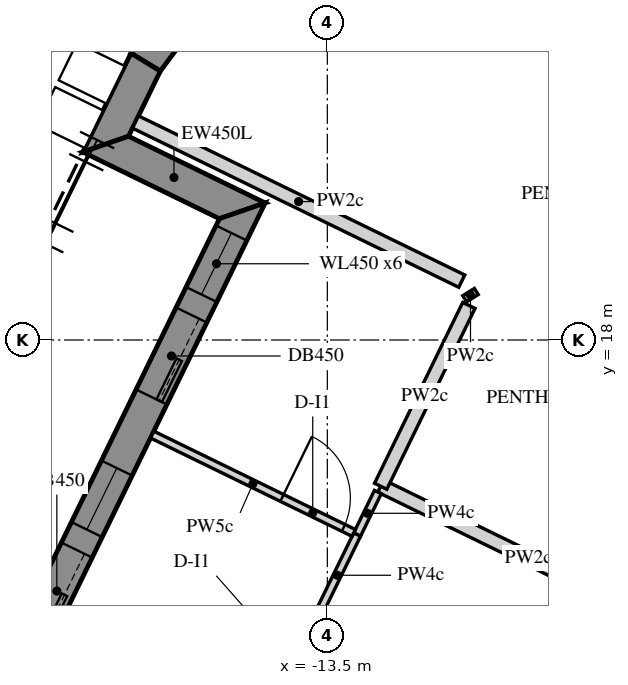
"""IFC4 building model, lengths in metres.
Left out: names, types, materials, properties, quantities, classifications, styles, units other than length and angle.
Written with IfcOpenShell. Run it as: python <this file> out.ifc"""

import sys

from ifc_helpers import new_model, si_unit, direction, frame, frame_2d, origin, place, context, subcontext, project, spatial, polyline, rectangle, outline, extrude, element, fill, save


model = new_model("IFC4")
c1 = context("Model", 3, precision=1e-05, world=origin(), true_north=direction((0.0, 1.0)))
c2 = subcontext(c1, "Body", "Model", "MODEL_VIEW")
j1 = project(units=[si_unit("LENGTHUNIT", "METRE"), si_unit("PLANEANGLEUNIT", "RADIAN")], contexts=[c1])
p1 = place(None, origin())
s1 = spatial("IfcSite", under=j1, at=p1, CompositionType="ELEMENT")
p2 = place(p1, origin())
s2 = spatial("IfcBuilding", under=s1, at=p2, CompositionType="ELEMENT")
p3 = place(p2, frame((0.0, 0.0, 361.2)))
s3 = spatial("IfcBuildingStorey", under=s2, at=p3, CompositionType="ELEMENT", Elevation=361.2)
p4 = place(p3, frame((-15.056, 22.776, -0.15), z_axis=(0.0, 0.0, 1.0), x_axis=(-0.597089203515, -0.802174845682, 0.0)))
e1 = element("IfcWall", 1, at=p4, inside=s3, PredefinedType="SOLIDWALL", context=c2, shape_type="SweptSolid", body=[
    extrude(outline(polyline([(-0.042, -0.225), (1.418, -0.225), (1.376, 0.225), (0.042, 0.225), (-0.042, -0.225)])), origin(), (0.0, 0.0, 1.0), 3.9),
])
p5 = place(p3, frame((-15.89, 21.655, -0.15), z_axis=(0.0, 0.0, 1.0), x_axis=(-0.438319390103, -0.898819287877, 0.0)))
e2 = element("IfcWall", 2, at=p5, inside=s3, PredefinedType="SOLIDWALL", context=c2, shape_type="SweptSolid", body=[
    extrude(outline(polyline([(-0.021, -0.225), (1.425, -0.225), (0.975, 0.225), (0.021, 0.225), (-0.021, -0.225)])), origin(), (0.0, 0.0, 1.0), 3.9),
])
p6 = place(p3, frame((-16.416, 20.576, -0.15), z_axis=(0.0, 0.0, 1.0), x_axis=(0.898730898244, -0.438500595829, 0.0)))
e3 = element("IfcWall", 3, at=p6, inside=s3, PredefinedType="SOLIDWALL", context=c2, shape_type="SweptSolid", body=[
    extrude(outline(polyline([(-0.225, -0.225), (1.775, -0.225), (2.225, 0.225), (0.225, 0.225), (-0.225, -0.225)])), origin(), (0.0, 0.0, 1.0), 3.9),
])
p7 = place(p3, frame((-14.619, 19.699, -0.15), z_axis=(0.0, 0.0, 1.0), x_axis=(-0.438373747484, -0.898792777851, 0.0)))
e4 = element("IfcWall", 4, at=p7, inside=s3, PredefinedType="SOLIDWALL", context=c2, shape_type="SweptSolid", body=[
    extrude(outline(polyline([(0.225, -0.225), (20.506, -0.225), (20.957, 0.225), (-0.225, 0.225), (0.225, -0.225)])), origin(), (0.0, 0.0, 1.0), 3.9),
])
p8 = place(p7, frame((0.325, 0.0, 1.05)))
e5 = element("IfcOpeningElement", 5, at=p8, cuts=e4, PredefinedType="OPENING", context=c2, shape_type="SweptSolid", body=[
    extrude(rectangle(XDim=0.9, YDim=1.5, at=frame_2d((0.45, 0.75))), frame((0.0, 0.235, 0.0), z_axis=(0.0, -1.0, 0.0), x_axis=(1.0, 0.0, 0.0)), (0.0, 0.0, 1.0), 0.47),
])
p9 = place(p7, frame((1.525, 0.0, 0.15)))
e6 = element("IfcOpeningElement", 6, at=p9, cuts=e4, PredefinedType="OPENING", context=c2, shape_type="SweptSolid", body=[
    extrude(rectangle(XDim=1.2, YDim=2.4, at=frame_2d((0.6, 1.2))), frame((0.0, 0.235, 0.0), z_axis=(0.0, -1.0, 0.0), x_axis=(1.0, 0.0, 0.0)), (0.0, 0.0, 1.0), 0.47),
])
p10 = place(p7, frame((3.766, 0.0, 1.05)))
e7 = element("IfcOpeningElement", 7, at=p10, cuts=e4, PredefinedType="OPENING", context=c2, shape_type="SweptSolid", body=[
    extrude(rectangle(XDim=0.9, YDim=1.5, at=frame_2d((0.45, 0.75))), frame((0.0, 0.235, 0.0), z_axis=(0.0, -1.0, 0.0), x_axis=(1.0, 0.0, 0.0)), (0.0, 0.0, 1.0), 0.47),
])
p11 = place(p7, frame((4.966, 0.0, 0.15)))
e8 = element("IfcOpeningElement", 8, at=p11, cuts=e4, PredefinedType="OPENING", context=c2, shape_type="SweptSolid", body=[
    extrude(rectangle(XDim=1.2, YDim=2.4, at=frame_2d((0.6, 1.2))), frame((0.0, 0.235, 0.0), z_axis=(0.0, -1.0, 0.0), x_axis=(1.0, 0.0, 0.0)), (0.0, 0.0, 1.0), 0.47),
])
p12 = place(p7, frame((7.366, 0.0, 1.05)))
e9 = element("IfcOpeningElement", 9, at=p12, cuts=e4, PredefinedType="OPENING", context=c2, shape_type="SweptSolid", body=[
    extrude(rectangle(XDim=0.9, YDim=1.5, at=frame_2d((0.45, 0.75))), frame((0.0, 0.235, 0.0), z_axis=(0.0, -1.0, 0.0), x_axis=(1.0, 0.0, 0.0)), (0.0, 0.0, 1.0), 0.47),
])
p13 = place(p7, frame((8.566, 0.0, 0.15)))
e10 = element("IfcOpeningElement", 10, at=p13, cuts=e4, PredefinedType="OPENING", context=c2, shape_type="SweptSolid", body=[
    extrude(rectangle(XDim=1.2, YDim=2.4, at=frame_2d((0.6, 1.2))), frame((0.0, 0.235, 0.0), z_axis=(0.0, -1.0, 0.0), x_axis=(1.0, 0.0, 0.0)), (0.0, 0.0, 1.0), 0.47),
])
p14 = place(p7, frame((10.966, 0.0, 1.05)))
e11 = element("IfcOpeningElement", 11, at=p14, cuts=e4, PredefinedType="OPENING", context=c2, shape_type="SweptSolid", body=[
    extrude(rectangle(XDim=0.9, YDim=1.5, at=frame_2d((0.45, 0.75))), frame((0.0, 0.235, 0.0), z_axis=(0.0, -1.0, 0.0), x_axis=(1.0, 0.0, 0.0)), (0.0, 0.0, 1.0), 0.47),
])
p15 = place(p7, frame((12.166, 0.0, 0.15)))
e12 = element("IfcOpeningElement", 12, at=p15, cuts=e4, PredefinedType="OPENING", context=c2, shape_type="SweptSolid", body=[
    extrude(rectangle(XDim=1.2, YDim=2.4, at=frame_2d((0.6, 1.2))), frame((0.0, 0.235, 0.0), z_axis=(0.0, -1.0, 0.0), x_axis=(1.0, 0.0, 0.0)), (0.0, 0.0, 1.0), 0.47),
])
p16 = place(p7, frame((14.566, 0.0, 1.05)))
e13 = element("IfcOpeningElement", 13, at=p16, cuts=e4, PredefinedType="OPENING", context=c2, shape_type="SweptSolid", body=[
    extrude(rectangle(XDim=0.9, YDim=1.5, at=frame_2d((0.45, 0.75))), frame((0.0, 0.235, 0.0), z_axis=(0.0, -1.0, 0.0), x_axis=(1.0, 0.0, 0.0)), (0.0, 0.0, 1.0), 0.47),
])
p17 = place(p7, frame((15.766, 0.0, 0.15)))
e14 = element("IfcOpeningElement", 14, at=p17, cuts=e4, PredefinedType="OPENING", context=c2, shape_type="SweptSolid", body=[
    extrude(rectangle(XDim=1.2, YDim=2.4, at=frame_2d((0.6, 1.2))), frame((0.0, 0.235, 0.0), z_axis=(0.0, -1.0, 0.0), x_axis=(1.0, 0.0, 0.0)), (0.0, 0.0, 1.0), 0.47),
])
p18 = place(p7, frame((18.007, 0.0, 1.05)))
e15 = element("IfcOpeningElement", 15, at=p18, cuts=e4, PredefinedType="OPENING", context=c2, shape_type="SweptSolid", body=[
    extrude(rectangle(XDim=0.9, YDim=1.5, at=frame_2d((0.45, 0.75))), frame((0.0, 0.235, 0.0), z_axis=(0.0, -1.0, 0.0), x_axis=(1.0, 0.0, 0.0)), (0.0, 0.0, 1.0), 0.47),
])
p19 = place(p7, frame((19.207, 0.0, 0.15)))
e16 = element("IfcOpeningElement", 16, at=p19, cuts=e4, PredefinedType="OPENING", context=c2, shape_type="SweptSolid", body=[
    extrude(rectangle(XDim=1.2, YDim=2.4, at=frame_2d((0.6, 1.2))), frame((0.0, 0.235, 0.0), z_axis=(0.0, -1.0, 0.0), x_axis=(1.0, 0.0, 0.0)), (0.0, 0.0, 1.0), 0.47),
])
p20 = place(p3, frame((-7.903, 16.075, 0.0), z_axis=(0.0, 0.0, 1.0), x_axis=(-0.438364761272, -0.898797160696, 0.0)))
e17 = element("IfcWall", 17, at=p20, inside=s3, PredefinedType="PARTITIONING", context=c2, shape_type="SweptSolid", body=[
    extrude(rectangle(XDim=15.688, YDim=0.15, at=frame_2d((7.844, 0.0))), origin(), (0.0, 0.0, 1.0), 2.82),
])
p21 = place(p20, frame((5.042, 0.0, 0.0)))
e18 = element("IfcOpeningElement", 18, at=p21, cuts=e17, PredefinedType="OPENING", context=c2, shape_type="SweptSolid", body=[
    extrude(rectangle(XDim=1.0, YDim=2.1, at=frame_2d((0.5, 1.05))), frame((0.0, 0.085, 0.0), z_axis=(0.0, -1.0, 0.0), x_axis=(1.0, 0.0, 0.0)), (0.0, 0.0, 1.0), 0.17),
])
p22 = place(p3, frame((-12.797, 16.079, 0.0), z_axis=(0.0, 0.0, 1.0), x_axis=(0.898786890582, -0.438385817879, 0.0)))
e19 = element("IfcWall", 19, at=p22, inside=s3, PredefinedType="PARTITIONING", context=c2, shape_type="SweptSolid", body=[
    extrude(rectangle(XDim=4.325, YDim=0.18, at=frame_2d((2.163, 0.0))), origin(), (0.0, 0.0, 1.0), 2.82),
])
p23 = place(p3, frame((-16.024, 20.868, 0.0), z_axis=(0.0, 0.0, 1.0), x_axis=(0.898790554329, -0.438378306317, 0.0)))
e20 = element("IfcWall", 20, at=p23, inside=s3, PredefinedType="PARTITIONING", context=c2, shape_type="SweptSolid", body=[
    extrude(rectangle(XDim=4.776, YDim=0.18, at=frame_2d((2.388, 0.0))), origin(), (0.0, 0.0, 1.0), 2.82),
])
p24 = place(p3, frame((-11.642, 18.63, 0.0), z_axis=(0.0, 0.0, 1.0), x_axis=(0.53069346288, -0.847563831494, 0.0)))
e21 = element("IfcWall", 21, at=p24, inside=s3, PredefinedType="PARTITIONING", context=c2, shape_type="SweptSolid", body=[
    extrude(rectangle(XDim=0.095, YDim=0.18, at=frame_2d((0.047, 0.0))), origin(), (0.0, 0.0, 1.0), 2.82),
])
p25 = place(p3, frame((-11.638, 18.455, 0.0), z_axis=(0.0, 0.0, 1.0), x_axis=(-0.438336396292, -0.898810994417, 0.0)))
e22 = element("IfcWall", 22, at=p25, inside=s3, PredefinedType="PARTITIONING", context=c2, shape_type="SweptSolid", body=[
    extrude(rectangle(XDim=2.647, YDim=0.18, at=frame_2d((1.323, 0.0))), origin(), (0.0, 0.0, 1.0), 2.82),
])
p26 = place(p3, frame((-12.835, 16.0, 0.0), z_axis=(0.0, 0.0, 1.0), x_axis=(-0.43824583471, -0.898855154271, 0.0)))
e23 = element("IfcWall", 23, at=p26, inside=s3, PredefinedType="PARTITIONING", context=c2, shape_type="SweptSolid", body=[
    extrude(rectangle(XDim=0.622, YDim=0.1, at=frame_2d((0.311, 0.0))), origin(), (0.0, 0.0, 1.0), 2.82),
])
p27 = place(p3, frame((-13.108, 15.44, 0.0), z_axis=(0.0, 0.0, 1.0), x_axis=(-0.438423632021, -0.898768445644, 0.0)))
e24 = element("IfcWall", 24, at=p27, inside=s3, PredefinedType="PARTITIONING", context=c2, shape_type="SweptSolid", body=[
    extrude(rectangle(XDim=1.192, YDim=0.1, at=frame_2d((0.596, 0.0))), origin(), (0.0, 0.0, 1.0), 2.82),
])
p28 = place(p3, frame((-15.804, 16.756, 0.0), z_axis=(0.0, 0.0, 1.0), x_axis=(0.898802642499, -0.438353521528, 0.0)))
e25 = element("IfcWall", 25, at=p28, inside=s3, PredefinedType="PARTITIONING", context=c2, shape_type="SweptSolid", body=[
    extrude(rectangle(XDim=2.95, YDim=0.1, at=frame_2d((1.475, 0.0))), origin(), (0.0, 0.0, 1.0), 2.82),
])
p29 = place(p28, frame((1.9, 0.0, 0.0)))
e26 = element("IfcOpeningElement", 26, at=p29, cuts=e25, PredefinedType="OPENING", context=c2, shape_type="SweptSolid", body=[
    extrude(rectangle(XDim=0.9, YDim=2.1, at=frame_2d((0.45, 1.05))), frame((0.0, 0.06, 0.0), z_axis=(0.0, -1.0, 0.0), x_axis=(1.0, 0.0, 0.0)), (0.0, 0.0, 1.0), 0.12),
])
p30 = place(p8, frame((0.0, 0.155, 0.0)))
e27 = element("IfcWindow", 27, at=p30, inside=s3, PartitioningType="SINGLE_PANEL", PredefinedType="WINDOW", context=c2, shape_type="SweptSolid", body=[
    extrude(rectangle(XDim=0.9, YDim=1.5, at=frame_2d((0.45, 0.75))), frame((0.0, 0.03, 0.0), z_axis=(0.0, -1.0, 0.0), x_axis=(1.0, 0.0, 0.0)), (0.0, 0.0, 1.0), 0.06),
])
fill(e5, e27)
p31 = place(p9, frame((0.0, 0.15, 0.0)))
e28 = element("IfcDoor", 28, at=p31, inside=s3, OperationType="SLIDING_TO_LEFT", PredefinedType="DOOR", context=c2, shape_type="SweptSolid", body=[
    extrude(rectangle(XDim=1.2, YDim=2.4, at=frame_2d((0.6, 1.2))), frame((0.0, 0.025, 0.0), z_axis=(0.0, -1.0, 0.0), x_axis=(1.0, 0.0, 0.0)), (0.0, 0.0, 1.0), 0.05),
])
fill(e6, e28)
p32 = place(p10, frame((0.0, 0.155, 0.0)))
e29 = element("IfcWindow", 29, at=p32, inside=s3, PartitioningType="SINGLE_PANEL", PredefinedType="WINDOW", context=c2, shape_type="SweptSolid", body=[
    extrude(rectangle(XDim=0.9, YDim=1.5, at=frame_2d((0.45, 0.75))), frame((0.0, 0.03, 0.0), z_axis=(0.0, -1.0, 0.0), x_axis=(1.0, 0.0, 0.0)), (0.0, 0.0, 1.0), 0.06),
])
fill(e7, e29)
p33 = place(p11, frame((0.0, 0.15, 0.0)))
e30 = element("IfcDoor", 30, at=p33, inside=s3, OperationType="SLIDING_TO_LEFT", PredefinedType="DOOR", context=c2, shape_type="SweptSolid", body=[
    extrude(rectangle(XDim=1.2, YDim=2.4, at=frame_2d((0.6, 1.2))), frame((0.0, 0.025, 0.0), z_axis=(0.0, -1.0, 0.0), x_axis=(1.0, 0.0, 0.0)), (0.0, 0.0, 1.0), 0.05),
])
fill(e8, e30)
p34 = place(p29, origin())
e31 = element("IfcDoor", 31, at=p34, inside=s3, OperationType="SINGLE_SWING_RIGHT", PredefinedType="DOOR", context=c2, shape_type="SweptSolid", body=[
    extrude(rectangle(XDim=0.9, YDim=2.1, at=frame_2d((0.45, 1.05))), frame((0.0, 0.025, 0.0), z_axis=(0.0, -1.0, 0.0), x_axis=(1.0, 0.0, 0.0)), (0.0, 0.0, 1.0), 0.05),
])
fill(e26, e31)
save(model, sys.argv[1])
